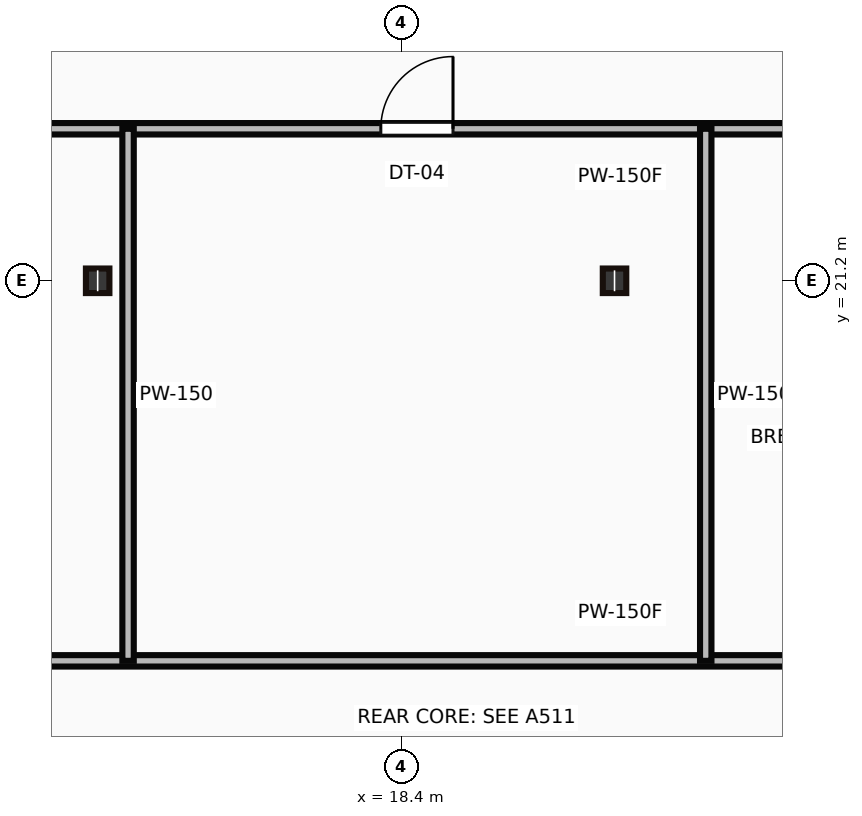
"""IFC4 building model, lengths in metres.
Left out: names, types, materials, properties, quantities, classifications, styles, units other than length and angle.
Written with IfcOpenShell. Run it as: python <this file> out.ifc"""

import sys

from ifc_helpers import new_model, si_unit, direction, frame, frame_2d, origin, origin_2d, place, context, subcontext, project, spatial, rectangle, i_section, extrude, source, transform, mapped, element, fill, save


model = new_model("IFC4")
c1 = context("Model", 3, precision=1e-05, world=origin(), true_north=direction((0.0, 1.0)))
c2 = subcontext(c1, "Body", "Model", "MODEL_VIEW")
j1 = project(units=[si_unit("LENGTHUNIT", "METRE"), si_unit("PLANEANGLEUNIT", "RADIAN")], contexts=[c1])
p1 = place(None, origin())
s1 = spatial("IfcSite", under=j1, at=p1, CompositionType="ELEMENT")
p2 = place(p1, origin())
s2 = spatial("IfcBuilding", under=s1, at=p2, CompositionType="ELEMENT")
p3 = place(p2, frame((0.0, 0.0, 251.5)))
s3 = spatial("IfcBuildingStorey", under=s2, at=p3, CompositionType="ELEMENT", Elevation=251.5)
m1 = source(origin(), c2, "Body", "SweptSolid", [
    extrude(i_section(OverallWidth=0.309, OverallDepth=0.323, WebThickness=0.014, FlangeThickness=0.023, at=origin_2d()), origin(), (0.0, 0.0, 1.0), 3.65),
])
for number, where, z_axis, x_axis in (
    (1, (14.4, 21.2, 0.0), (0.0, 0.0, 1.0), (1.0, 0.0, 0.0)),
    (2, (21.2, 21.2, 0.0), (0.0, 0.0, 1.0), (1.0, 0.0, 0.0)),
):
    element("IfcColumn", number, at=place(p3, frame(where, z_axis=z_axis, x_axis=x_axis)), inside=s3, PredefinedType="COLUMN", context=c2, shape_type="MappedRepresentation", body=[
        mapped(m1, transform((0.0, 0.0, 0.0))),
    ])
m2 = source(origin(), c2, "Body", "SweptSolid", [
    extrude(rectangle(XDim=28.65, YDim=0.15, at=frame_2d((14.325, 0.0))), origin(), (0.0, 0.0, 1.0), 3.4),
])
p4 = place(p3, frame((6.95, 16.2, 0.0), z_axis=(0.0, 0.0, 1.0), x_axis=(1.0, 0.0, 0.0)))
e3 = element("IfcWall", 3, at=p4, inside=s3, PredefinedType="PARTITIONING", context=c2, shape_type="MappedRepresentation", body=[
    mapped(m2, transform((0.0, 0.0, 0.0))),
])
p5 = place(p4, frame((21.445, 0.0, 0.0)))
e4 = element("IfcOpeningElement", 4, at=p5, cuts=e3, PredefinedType="OPENING", context=c2, shape_type="SweptSolid", body=[
    extrude(rectangle(XDim=0.95, YDim=2.15, at=frame_2d((0.475, 1.075))), frame((0.0, 0.085, 0.0), z_axis=(0.0, -1.0, 0.0), x_axis=(1.0, 0.0, 0.0)), (0.0, 0.0, 1.0), 0.17),
])
p6 = place(p3, frame((35.6, 23.2, 0.0), z_axis=(0.0, 0.0, 1.0), x_axis=(-1.0, 0.0, 0.0)))
e5 = element("IfcWall", 5, at=p6, inside=s3, PredefinedType="PARTITIONING", context=c2, shape_type="MappedRepresentation", body=[
    mapped(m2, transform((0.0, 0.0, 0.0))),
])
p7 = place(p6, frame((24.12, 0.0, 0.0)))
e6 = element("IfcOpeningElement", 6, at=p7, cuts=e5, PredefinedType="OPENING", context=c2, shape_type="SweptSolid", body=[
    extrude(rectangle(XDim=0.95, YDim=2.15, at=frame_2d((0.475, 1.075))), frame((0.0, 0.085, 0.0), z_axis=(0.0, -1.0, 0.0), x_axis=(1.0, 0.0, 0.0)), (0.0, 0.0, 1.0), 0.17),
])
p8 = place(p6, frame((16.525, 0.0, 0.0)))
e7 = element("IfcOpeningElement", 7, at=p8, cuts=e5, PredefinedType="OPENING", context=c2, shape_type="SweptSolid", body=[
    extrude(rectangle(XDim=0.95, YDim=2.15, at=frame_2d((0.475, 1.075))), frame((0.0, 0.085, 0.0), z_axis=(0.0, -1.0, 0.0), x_axis=(1.0, 0.0, 0.0)), (0.0, 0.0, 1.0), 0.17),
])
m3 = source(origin(), c2, "Body", "SweptSolid", [
    extrude(rectangle(XDim=7.0, YDim=0.15, at=frame_2d((3.5, 0.0))), origin(), (0.0, 0.0, 1.0), 3.4),
])
for number, where, z_axis, x_axis in (
    (8, (14.8, 23.2, 0.0), (0.0, 0.0, 1.0), (0.0, -1.0, 0.0)),
    (9, (22.4, 23.2, 0.0), (0.0, 0.0, 1.0), (0.0, -1.0, 0.0)),
):
    element("IfcWall", number, at=place(p3, frame(where, z_axis=z_axis, x_axis=x_axis)), inside=s3, PredefinedType="PARTITIONING", context=c2, shape_type="MappedRepresentation", body=[
        mapped(m3, transform((0.0, 0.0, 0.0))),
    ])
m4 = source(origin(), c2, "Body", "SweptSolid", [
    extrude(rectangle(XDim=0.95, YDim=2.15, at=frame_2d((0.475, 1.075))), frame((0.0, 0.025, 0.0), z_axis=(0.0, -1.0, 0.0), x_axis=(1.0, 0.0, 0.0)), (0.0, 0.0, 1.0), 0.05),
])
p9 = place(p8, origin())
e10 = element("IfcDoor", 10, at=p9, inside=s3, OperationType="SINGLE_SWING_LEFT", PredefinedType="DOOR", context=c2, shape_type="MappedRepresentation", body=[
    mapped(m4, transform((0.0, 0.0, 0.0))),
])
fill(e7, e10)
save(model, sys.argv[1])
